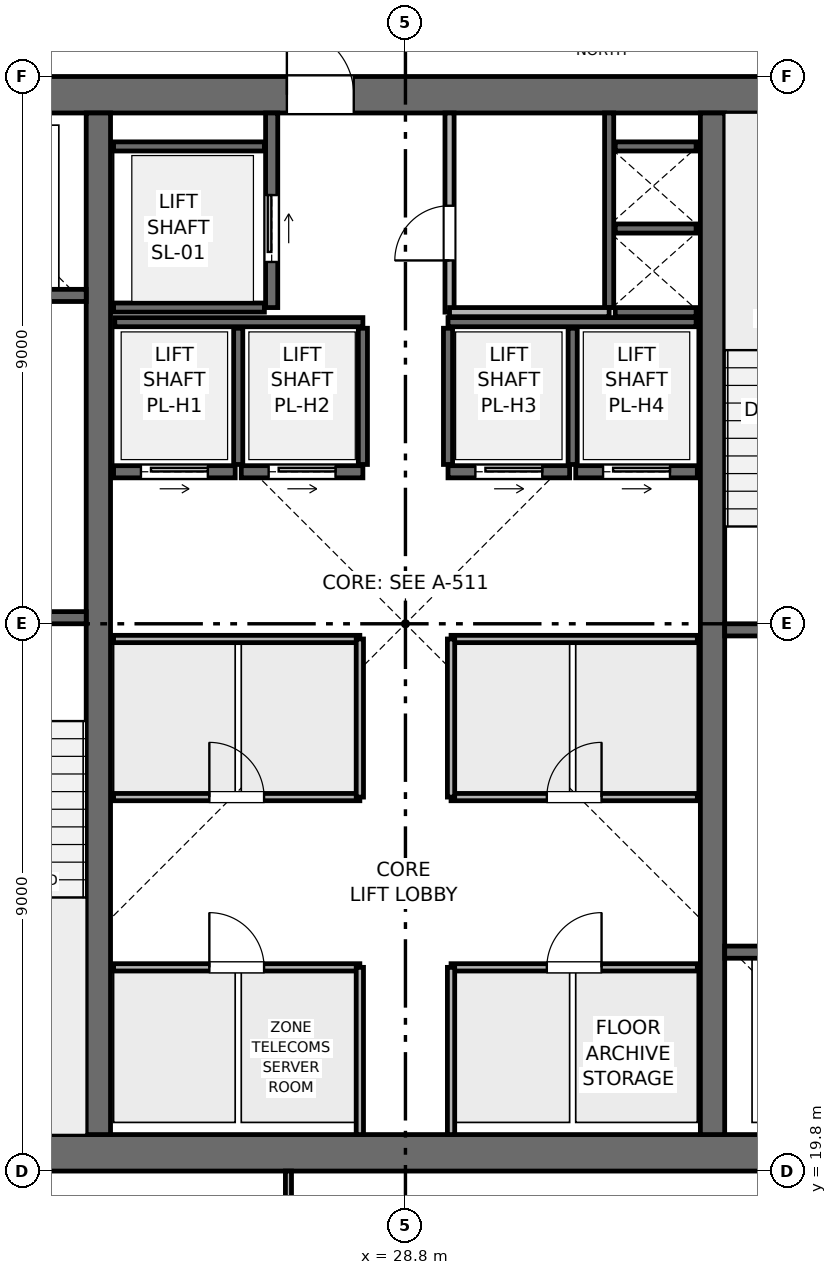
"""IFC4 building model, lengths in metres.
Left out: names, types, materials, properties, quantities, classifications, styles, units other than length and angle.
Written with IfcOpenShell. Run it as: python <this file> out.ifc"""

import sys

from ifc_helpers import new_model, si_unit, direction, frame, frame_2d, origin, place, context, subcontext, project, spatial, rectangle, extrude, element, fill, save


model = new_model("IFC4")
c1 = context("Model", 3, precision=1e-05, world=origin(), true_north=direction((0.0, 1.0)))
c2 = subcontext(c1, "Body", "Model", "MODEL_VIEW")
j1 = project(units=[si_unit("LENGTHUNIT", "METRE"), si_unit("PLANEANGLEUNIT", "RADIAN")], contexts=[c1])
p1 = place(None, origin())
s1 = spatial("IfcSite", under=j1, at=p1, CompositionType="ELEMENT")
p2 = place(p1, origin())
s2 = spatial("IfcBuilding", under=s1, at=p2, CompositionType="ELEMENT")
p3 = place(p2, frame((0.0, 0.0, 344.25)))
s3 = spatial("IfcBuildingStorey", under=s2, at=p3, CompositionType="ELEMENT", Elevation=344.25)
p4 = place(p3, frame((19.8, 20.1, 0.0), z_axis=(0.0, 0.0, 1.0), x_axis=(1.0, 0.0, 0.0)))
e1 = element("IfcWall", 1, at=p4, inside=s3, PredefinedType="SHEAR", context=c2, shape_type="SweptSolid", body=[
    extrude(rectangle(XDim=18.0, YDim=0.6, at=frame_2d((9.0, 0.0))), origin(), (0.0, 0.0, 1.0), 3.75),
])
p5 = place(p3, frame((19.8, 37.5, 0.0), z_axis=(0.0, 0.0, 1.0), x_axis=(1.0, 0.0, 0.0)))
e2 = element("IfcWall", 2, at=p5, inside=s3, PredefinedType="SHEAR", context=c2, shape_type="SweptSolid", body=[
    extrude(rectangle(XDim=18.0, YDim=0.6, at=frame_2d((9.0, 0.0))), origin(), (0.0, 0.0, 1.0), 3.75),
])
p6 = place(p5, frame((7.05, 0.0, 0.0)))
e3 = element("IfcOpeningElement", 3, at=p6, cuts=e2, PredefinedType="OPENING", context=c2, shape_type="SweptSolid", body=[
    extrude(rectangle(XDim=1.1, YDim=2.15, at=frame_2d((0.55, 1.075))), frame((0.0, 0.31, 0.0), z_axis=(0.0, -1.0, 0.0), x_axis=(1.0, 0.0, 0.0)), (0.0, 0.0, 1.0), 0.62),
])
for number, where, z_axis, x_axis in (
    (4, (23.75, 20.4, 0.0), (0.0, 0.0, 1.0), (0.0, 1.0, 0.0)),
    (5, (33.85, 20.4, 0.0), (0.0, 0.0, 1.0), (0.0, 1.0, 0.0)),
):
    element("IfcWall", number, at=place(p3, frame(where, z_axis=z_axis, x_axis=x_axis)), inside=s3, PredefinedType="SHEAR", context=c2, shape_type="SweptSolid", body=[
        extrude(rectangle(XDim=16.8, YDim=0.4, at=frame_2d((8.4, 0.0))), origin(), (0.0, 0.0, 1.0), 3.75),
    ])
p7 = place(p3, frame((20.4, 28.9, 0.0), z_axis=(0.0, 0.0, 1.0), x_axis=(1.0, 0.0, 0.0)))
e6 = element("IfcWall", 6, at=p7, inside=s3, PredefinedType="SHEAR", context=c2, shape_type="SweptSolid", body=[
    extrude(rectangle(XDim=3.15, YDim=0.2, at=frame_2d((1.575, 0.0))), origin(), (0.0, 0.0, 1.0), 3.51),
])
p8 = place(p7, frame((0.8, 0.0, 0.0)))
e7 = element("IfcOpeningElement", 7, at=p8, cuts=e6, PredefinedType="OPENING", context=c2, shape_type="SweptSolid", body=[
    extrude(rectangle(XDim=1.0, YDim=2.1, at=frame_2d((0.5, 1.05))), frame((0.0, 0.11, 0.0), z_axis=(0.0, -1.0, 0.0), x_axis=(1.0, 0.0, 0.0)), (0.0, 0.0, 1.0), 0.22),
])
p9 = place(p3, frame((34.05, 28.7, 0.0), z_axis=(0.0, 0.0, 1.0), x_axis=(1.0, 0.0, 0.0)))
e8 = element("IfcWall", 8, at=p9, inside=s3, PredefinedType="SHEAR", context=c2, shape_type="SweptSolid", body=[
    extrude(rectangle(XDim=3.15, YDim=0.2, at=frame_2d((1.575, 0.0))), origin(), (0.0, 0.0, 1.0), 3.51),
])
p10 = place(p9, frame((0.8, 0.0, 0.0)))
e9 = element("IfcOpeningElement", 9, at=p10, cuts=e8, PredefinedType="OPENING", context=c2, shape_type="SweptSolid", body=[
    extrude(rectangle(XDim=1.0, YDim=2.1, at=frame_2d((0.5, 1.05))), frame((0.0, 0.11, 0.0), z_axis=(0.0, -1.0, 0.0), x_axis=(1.0, 0.0, 0.0)), (0.0, 0.0, 1.0), 0.22),
])
p11 = place(p3, frame((32.15, 34.0, 0.0), z_axis=(0.0, 0.0, 1.0), x_axis=(0.0, 1.0, 0.0)))
e10 = element("IfcWall", 10, at=p11, inside=s3, PredefinedType="SHEAR", context=c2, shape_type="SweptSolid", body=[
    extrude(rectangle(XDim=3.2, YDim=0.15, at=frame_2d((1.6, 0.0))), origin(), (0.0, 0.0, 1.0), 3.51),
])
for number, where, z_axis, x_axis in (
    (11, (32.25, 33.925, 0.0), (0.0, 0.0, 1.0), (1.0, 0.0, 0.0)),
    (12, (32.25, 35.3, 0.0), (0.0, 0.0, 1.0), (1.0, 0.0, 0.0)),
):
    element("IfcWall", number, at=place(p3, frame(where, z_axis=z_axis, x_axis=x_axis)), inside=s3, PredefinedType="SHEAR", context=c2, shape_type="SweptSolid", body=[
        extrude(rectangle(XDim=1.33, YDim=0.15, at=frame_2d((0.665, 0.0))), origin(), (0.0, 0.0, 1.0), 3.51),
    ])
p12 = place(p3, frame((20.5, 34.2, 0.0), z_axis=(0.0, 0.0, 1.0), x_axis=(1.0, 0.0, 0.0)))
e13 = element("IfcWall", 13, at=p12, inside=s3, PredefinedType="SHEAR", context=c2, shape_type="SweptSolid", body=[
    extrude(rectangle(XDim=3.05, YDim=0.2, at=frame_2d((1.525, 0.0))), origin(), (0.0, 0.0, 1.0), 3.51),
])
p13 = place(p12, frame((0.75, 0.0, 0.0)))
e14 = element("IfcOpeningElement", 14, at=p13, cuts=e13, PredefinedType="OPENING", context=c2, shape_type="SweptSolid", body=[
    extrude(rectangle(XDim=1.1, YDim=2.15, at=frame_2d((0.55, 1.075))), frame((0.0, 0.11, 0.0), z_axis=(0.0, -1.0, 0.0), x_axis=(1.0, 0.0, 0.0)), (0.0, 0.0, 1.0), 0.22),
])
p14 = place(p3, frame((34.05, 23.4, 0.0), z_axis=(0.0, 0.0, 1.0), x_axis=(1.0, 0.0, 0.0)))
e15 = element("IfcWall", 15, at=p14, inside=s3, PredefinedType="SHEAR", context=c2, shape_type="SweptSolid", body=[
    extrude(rectangle(XDim=3.05, YDim=0.2, at=frame_2d((1.525, 0.0))), origin(), (0.0, 0.0, 1.0), 3.51),
])
p15 = place(p14, frame((1.2, 0.0, 0.0)))
e16 = element("IfcOpeningElement", 16, at=p15, cuts=e15, PredefinedType="OPENING", context=c2, shape_type="SweptSolid", body=[
    extrude(rectangle(XDim=1.1, YDim=2.15, at=frame_2d((0.55, 1.075))), frame((0.0, 0.11, 0.0), z_axis=(0.0, -1.0, 0.0), x_axis=(1.0, 0.0, 0.0)), (0.0, 0.0, 1.0), 0.22),
])
p16 = place(p3, frame((26.6, 34.0, 0.0), z_axis=(0.0, 0.0, 1.0), x_axis=(0.0, 1.0, 0.0)))
e17 = element("IfcWall", 17, at=p16, inside=s3, PredefinedType="SHEAR", context=c2, shape_type="SweptSolid", body=[
    extrude(rectangle(XDim=3.2, YDim=0.2, at=frame_2d((1.6, 0.0))), origin(), (0.0, 0.0, 1.0), 3.51),
])
p17 = place(p16, frame((0.75, 0.0, 0.0)))
e18 = element("IfcOpeningElement", 18, at=p17, cuts=e17, PredefinedType="OPENING", context=c2, shape_type="SweptSolid", body=[
    extrude(rectangle(XDim=1.1, YDim=2.15, at=frame_2d((0.55, 1.075))), frame((0.0, 0.11, 0.0), z_axis=(0.0, -1.0, 0.0), x_axis=(1.0, 0.0, 0.0)), (0.0, 0.0, 1.0), 0.22),
])
for number, where, z_axis, x_axis in (
    (19, (24.0, 34.0, 0.0), (0.0, 0.0, 1.0), (1.0, 0.0, 0.0)),
    (20, (24.0, 36.65, 0.0), (0.0, 0.0, 1.0), (1.0, 0.0, 0.0)),
):
    element("IfcWall", number, at=place(p3, frame(where, z_axis=z_axis, x_axis=x_axis)), inside=s3, PredefinedType="SHEAR", context=c2, shape_type="SweptSolid", body=[
        extrude(rectangle(XDim=2.48, YDim=0.15, at=frame_2d((1.24, 0.0))), origin(), (0.0, 0.0, 1.0), 3.51),
    ])
p18 = place(p3, frame((24.0, 31.3, 0.0), z_axis=(0.0, 0.0, 1.0), x_axis=(1.0, 0.0, 0.0)))
e21 = element("IfcWall", 21, at=p18, inside=s3, PredefinedType="SHEAR", context=c2, shape_type="SweptSolid", body=[
    extrude(rectangle(XDim=2.0, YDim=0.2, at=frame_2d((1.0, 0.0))), origin(), (0.0, 0.0, 1.0), 3.51),
])
p19 = place(p18, frame((0.45, 0.0, 0.0)))
e22 = element("IfcOpeningElement", 22, at=p19, cuts=e21, PredefinedType="OPENING", context=c2, shape_type="SweptSolid", body=[
    extrude(rectangle(XDim=1.1, YDim=2.15, at=frame_2d((0.55, 1.075))), frame((0.0, 0.11, 0.0), z_axis=(0.0, -1.0, 0.0), x_axis=(1.0, 0.0, 0.0)), (0.0, 0.0, 1.0), 0.22),
])
p20 = place(p3, frame((26.1, 31.3, 0.0), z_axis=(0.0, 0.0, 1.0), x_axis=(1.0, 0.0, 0.0)))
e23 = element("IfcWall", 23, at=p20, inside=s3, PredefinedType="SHEAR", context=c2, shape_type="SweptSolid", body=[
    extrude(rectangle(XDim=2.0, YDim=0.2, at=frame_2d((1.0, 0.0))), origin(), (0.0, 0.0, 1.0), 3.51),
])
p21 = place(p20, frame((0.45, 0.0, 0.0)))
e24 = element("IfcOpeningElement", 24, at=p21, cuts=e23, PredefinedType="OPENING", context=c2, shape_type="SweptSolid", body=[
    extrude(rectangle(XDim=1.1, YDim=2.15, at=frame_2d((0.55, 1.075))), frame((0.0, 0.11, 0.0), z_axis=(0.0, -1.0, 0.0), x_axis=(1.0, 0.0, 0.0)), (0.0, 0.0, 1.0), 0.22),
])
p22 = place(p3, frame((29.5, 31.3, 0.0), z_axis=(0.0, 0.0, 1.0), x_axis=(1.0, 0.0, 0.0)))
e25 = element("IfcWall", 25, at=p22, inside=s3, PredefinedType="SHEAR", context=c2, shape_type="SweptSolid", body=[
    extrude(rectangle(XDim=2.0, YDim=0.2, at=frame_2d((1.0, 0.0))), origin(), (0.0, 0.0, 1.0), 3.51),
])
p23 = place(p22, frame((0.45, 0.0, 0.0)))
e26 = element("IfcOpeningElement", 26, at=p23, cuts=e25, PredefinedType="OPENING", context=c2, shape_type="SweptSolid", body=[
    extrude(rectangle(XDim=1.1, YDim=2.15, at=frame_2d((0.55, 1.075))), frame((0.0, 0.11, 0.0), z_axis=(0.0, -1.0, 0.0), x_axis=(1.0, 0.0, 0.0)), (0.0, 0.0, 1.0), 0.22),
])
p24 = place(p3, frame((31.6, 31.3, 0.0), z_axis=(0.0, 0.0, 1.0), x_axis=(1.0, 0.0, 0.0)))
e27 = element("IfcWall", 27, at=p24, inside=s3, PredefinedType="SHEAR", context=c2, shape_type="SweptSolid", body=[
    extrude(rectangle(XDim=2.0, YDim=0.2, at=frame_2d((1.0, 0.0))), origin(), (0.0, 0.0, 1.0), 3.51),
])
p25 = place(p24, frame((0.45, 0.0, 0.0)))
e28 = element("IfcOpeningElement", 28, at=p25, cuts=e27, PredefinedType="OPENING", context=c2, shape_type="SweptSolid", body=[
    extrude(rectangle(XDim=1.1, YDim=2.15, at=frame_2d((0.55, 1.075))), frame((0.0, 0.11, 0.0), z_axis=(0.0, -1.0, 0.0), x_axis=(1.0, 0.0, 0.0)), (0.0, 0.0, 1.0), 0.22),
])
p26 = place(p3, frame((32.25, 36.65, 0.0), z_axis=(0.0, 0.0, 1.0), x_axis=(1.0, 0.0, 0.0)))
e29 = element("IfcWall", 29, at=p26, inside=s3, PredefinedType="SHEAR", context=c2, shape_type="SweptSolid", body=[
    extrude(rectangle(XDim=1.33, YDim=0.15, at=frame_2d((0.665, 0.0))), origin(), (0.0, 0.0, 1.0), 3.51),
])
for number, where, z_axis, x_axis in (
    (30, (24.02, 33.76, 0.0), (0.0, 0.0, 1.0), (1.0, 0.0, 0.0)),
    (31, (29.5, 33.76, 0.0), (0.0, 0.0, 1.0), (1.0, 0.0, 0.0)),
):
    element("IfcWall", number, at=place(p3, frame(where, z_axis=z_axis, x_axis=x_axis)), inside=s3, PredefinedType="SHEAR", context=c2, shape_type="SweptSolid", body=[
        extrude(rectangle(XDim=4.08, YDim=0.15, at=frame_2d((2.04, 0.0))), origin(), (0.0, 0.0, 1.0), 3.51),
    ])
for number, where, z_axis, x_axis in (
    (32, (26.05, 31.42, 0.0), (0.0, 0.0, 1.0), (0.0, 1.0, 0.0)),
    (33, (28.1, 31.42, 0.0), (0.0, 0.0, 1.0), (0.0, 1.0, 0.0)),
    (34, (29.5, 31.42, 0.0), (0.0, 0.0, 1.0), (0.0, 1.0, 0.0)),
    (35, (31.55, 31.42, 0.0), (0.0, 0.0, 1.0), (0.0, 1.0, 0.0)),
):
    element("IfcWall", number, at=place(p3, frame(where, z_axis=z_axis, x_axis=x_axis)), inside=s3, PredefinedType="SHEAR", context=c2, shape_type="SweptSolid", body=[
        extrude(rectangle(XDim=2.24, YDim=0.15, at=frame_2d((1.12, 0.0))), origin(), (0.0, 0.0, 1.0), 3.51),
    ])
p27 = place(p3, frame((29.525, 33.925, 0.0), z_axis=(0.0, 0.0, 1.0), x_axis=(0.0, 1.0, 0.0)))
e36 = element("IfcWall", 36, at=p27, inside=s3, PredefinedType="PARTITIONING", context=c2, shape_type="SweptSolid", body=[
    extrude(rectangle(XDim=3.275, YDim=0.15, at=frame_2d((1.637, 0.0))), origin(), (0.0, 0.0, 1.0), 3.51),
])
p28 = place(p27, frame((0.85, 0.0, 0.0)))
e37 = element("IfcOpeningElement", 37, at=p28, cuts=e36, PredefinedType="OPENING", context=c2, shape_type="SweptSolid", body=[
    extrude(rectangle(XDim=0.9, YDim=2.1, at=frame_2d((0.45, 1.05))), frame((0.0, 0.085, 0.0), z_axis=(0.0, -1.0, 0.0), x_axis=(1.0, 0.0, 0.0)), (0.0, 0.0, 1.0), 0.17),
])
p29 = place(p3, frame((29.525, 33.925, 0.0), z_axis=(0.0, 0.0, 1.0), x_axis=(1.0, 0.0, 0.0)))
e38 = element("IfcWall", 38, at=p29, inside=s3, PredefinedType="PARTITIONING", context=c2, shape_type="SweptSolid", body=[
    extrude(rectangle(XDim=2.625, YDim=0.15, at=frame_2d((1.312, 0.0))), origin(), (0.0, 0.0, 1.0), 3.51),
])
p30 = place(p3, frame((24.0, 23.15, 0.0), z_axis=(0.0, 0.0, 1.0), x_axis=(1.0, 0.0, 0.0)))
e39 = element("IfcWall", 39, at=p30, inside=s3, PredefinedType="PARTITIONING", context=c2, shape_type="SweptSolid", body=[
    extrude(rectangle(XDim=4.05, YDim=0.12, at=frame_2d((2.025, 0.0))), origin(), (0.0, 0.0, 1.0), 3.51),
])
p31 = place(p30, frame((1.575, 0.0, 0.0)))
e40 = element("IfcOpeningElement", 40, at=p31, cuts=e39, PredefinedType="OPENING", context=c2, shape_type="SweptSolid", body=[
    extrude(rectangle(XDim=0.9, YDim=2.1, at=frame_2d((0.45, 1.05))), frame((0.0, 0.07, 0.0), z_axis=(0.0, -1.0, 0.0), x_axis=(1.0, 0.0, 0.0)), (0.0, 0.0, 1.0), 0.14),
])
p32 = place(p3, frame((28.05, 20.4, 0.0), z_axis=(0.0, 0.0, 1.0), x_axis=(0.0, 1.0, 0.0)))
e41 = element("IfcWall", 41, at=p32, inside=s3, PredefinedType="PARTITIONING", context=c2, shape_type="SweptSolid", body=[
    extrude(rectangle(XDim=2.75, YDim=0.12, at=frame_2d((1.375, 0.0))), origin(), (0.0, 0.0, 1.0), 3.51),
])
p33 = place(p3, frame((29.55, 23.15, 0.0), z_axis=(0.0, 0.0, 1.0), x_axis=(1.0, 0.0, 0.0)))
e42 = element("IfcWall", 42, at=p33, inside=s3, PredefinedType="PARTITIONING", context=c2, shape_type="SweptSolid", body=[
    extrude(rectangle(XDim=4.05, YDim=0.12, at=frame_2d((2.025, 0.0))), origin(), (0.0, 0.0, 1.0), 3.51),
])
p34 = place(p33, frame((1.575, 0.0, 0.0)))
e43 = element("IfcOpeningElement", 43, at=p34, cuts=e42, PredefinedType="OPENING", context=c2, shape_type="SweptSolid", body=[
    extrude(rectangle(XDim=0.9, YDim=2.1, at=frame_2d((0.45, 1.05))), frame((0.0, 0.07, 0.0), z_axis=(0.0, -1.0, 0.0), x_axis=(1.0, 0.0, 0.0)), (0.0, 0.0, 1.0), 0.14),
])
p35 = place(p3, frame((29.55, 20.4, 0.0), z_axis=(0.0, 0.0, 1.0), x_axis=(0.0, 1.0, 0.0)))
e44 = element("IfcWall", 44, at=p35, inside=s3, PredefinedType="PARTITIONING", context=c2, shape_type="SweptSolid", body=[
    extrude(rectangle(XDim=2.75, YDim=0.12, at=frame_2d((1.375, 0.0))), origin(), (0.0, 0.0, 1.0), 3.51),
])
p36 = place(p3, frame((24.0, 25.95, 0.0), z_axis=(0.0, 0.0, 1.0), x_axis=(1.0, 0.0, 0.0)))
e45 = element("IfcWall", 45, at=p36, inside=s3, PredefinedType="PARTITIONING", context=c2, shape_type="SweptSolid", body=[
    extrude(rectangle(XDim=4.05, YDim=0.12, at=frame_2d((2.025, 0.0))), origin(), (0.0, 0.0, 1.0), 3.51),
])
p37 = place(p36, frame((1.575, 0.0, 0.0)))
e46 = element("IfcOpeningElement", 46, at=p37, cuts=e45, PredefinedType="OPENING", context=c2, shape_type="SweptSolid", body=[
    extrude(rectangle(XDim=0.9, YDim=2.1, at=frame_2d((0.45, 1.05))), frame((0.0, 0.07, 0.0), z_axis=(0.0, -1.0, 0.0), x_axis=(1.0, 0.0, 0.0)), (0.0, 0.0, 1.0), 0.14),
])
p38 = place(p3, frame((24.0, 28.55, 0.0), z_axis=(0.0, 0.0, 1.0), x_axis=(1.0, 0.0, 0.0)))
e47 = element("IfcWall", 47, at=p38, inside=s3, PredefinedType="PARTITIONING", context=c2, shape_type="SweptSolid", body=[
    extrude(rectangle(XDim=4.05, YDim=0.12, at=frame_2d((2.025, 0.0))), origin(), (0.0, 0.0, 1.0), 3.51),
])
p39 = place(p3, frame((28.05, 25.95, 0.0), z_axis=(0.0, 0.0, 1.0), x_axis=(0.0, 1.0, 0.0)))
e48 = element("IfcWall", 48, at=p39, inside=s3, PredefinedType="PARTITIONING", context=c2, shape_type="SweptSolid", body=[
    extrude(rectangle(XDim=2.6, YDim=0.12, at=frame_2d((1.3, 0.0))), origin(), (0.0, 0.0, 1.0), 3.51),
])
p40 = place(p3, frame((29.55, 25.95, 0.0), z_axis=(0.0, 0.0, 1.0), x_axis=(1.0, 0.0, 0.0)))
e49 = element("IfcWall", 49, at=p40, inside=s3, PredefinedType="PARTITIONING", context=c2, shape_type="SweptSolid", body=[
    extrude(rectangle(XDim=4.05, YDim=0.12, at=frame_2d((2.025, 0.0))), origin(), (0.0, 0.0, 1.0), 3.51),
])
p41 = place(p40, frame((1.575, 0.0, 0.0)))
e50 = element("IfcOpeningElement", 50, at=p41, cuts=e49, PredefinedType="OPENING", context=c2, shape_type="SweptSolid", body=[
    extrude(rectangle(XDim=0.9, YDim=2.1, at=frame_2d((0.45, 1.05))), frame((0.0, 0.07, 0.0), z_axis=(0.0, -1.0, 0.0), x_axis=(1.0, 0.0, 0.0)), (0.0, 0.0, 1.0), 0.14),
])
p42 = place(p3, frame((29.55, 28.55, 0.0), z_axis=(0.0, 0.0, 1.0), x_axis=(1.0, 0.0, 0.0)))
e51 = element("IfcWall", 51, at=p42, inside=s3, PredefinedType="PARTITIONING", context=c2, shape_type="SweptSolid", body=[
    extrude(rectangle(XDim=4.05, YDim=0.12, at=frame_2d((2.025, 0.0))), origin(), (0.0, 0.0, 1.0), 3.51),
])
p43 = place(p3, frame((29.55, 25.95, 0.0), z_axis=(0.0, 0.0, 1.0), x_axis=(0.0, 1.0, 0.0)))
e52 = element("IfcWall", 52, at=p43, inside=s3, PredefinedType="PARTITIONING", context=c2, shape_type="SweptSolid", body=[
    extrude(rectangle(XDim=2.6, YDim=0.12, at=frame_2d((1.3, 0.0))), origin(), (0.0, 0.0, 1.0), 3.51),
])
p44 = place(p3, frame((26.876, 7.63, 0.0), z_axis=(0.0, 0.0, 1.0), x_axis=(0.0, 1.0, 0.0)))
e53 = element("IfcWall", 53, at=p44, inside=s3, PredefinedType="MOVABLE", context=c2, shape_type="SweptSolid", body=[
    extrude(rectangle(XDim=12.17, YDim=0.1, at=frame_2d((6.085, 0.0))), origin(), (0.0, 0.0, 1.0), 3.135),
])
p45 = place(p44, frame((9.77, 0.0, 0.0)))
e54 = element("IfcOpeningElement", 54, at=p45, cuts=e53, PredefinedType="OPENING", context=c2, shape_type="SweptSolid", body=[
    extrude(rectangle(XDim=0.9, YDim=2.1, at=frame_2d((0.45, 1.05))), frame((0.0, 0.06, 0.0), z_axis=(0.0, -1.0, 0.0), x_axis=(1.0, 0.0, 0.0)), (0.0, 0.0, 1.0), 0.12),
])
p46 = place(p17, origin())
e55 = element("IfcDoor", 55, at=p46, inside=s3, OperationType="SLIDING_TO_RIGHT", PredefinedType="DOOR", context=c2, shape_type="SweptSolid", body=[
    extrude(rectangle(XDim=1.1, YDim=2.15, at=frame_2d((0.55, 1.075))), frame((0.0, 0.025, 0.0), z_axis=(0.0, -1.0, 0.0), x_axis=(1.0, 0.0, 0.0)), (0.0, 0.0, 1.0), 0.05),
])
fill(e18, e55)
p47 = place(p19, origin())
e56 = element("IfcDoor", 56, at=p47, inside=s3, OperationType="SLIDING_TO_RIGHT", PredefinedType="DOOR", context=c2, shape_type="SweptSolid", body=[
    extrude(rectangle(XDim=1.1, YDim=2.15, at=frame_2d((0.55, 1.075))), frame((0.0, 0.025, 0.0), z_axis=(0.0, -1.0, 0.0), x_axis=(1.0, 0.0, 0.0)), (0.0, 0.0, 1.0), 0.05),
])
fill(e22, e56)
p48 = place(p21, origin())
e57 = element("IfcDoor", 57, at=p48, inside=s3, OperationType="SLIDING_TO_RIGHT", PredefinedType="DOOR", context=c2, shape_type="SweptSolid", body=[
    extrude(rectangle(XDim=1.1, YDim=2.15, at=frame_2d((0.55, 1.075))), frame((0.0, 0.025, 0.0), z_axis=(0.0, -1.0, 0.0), x_axis=(1.0, 0.0, 0.0)), (0.0, 0.0, 1.0), 0.05),
])
fill(e24, e57)
p49 = place(p23, origin())
e58 = element("IfcDoor", 58, at=p49, inside=s3, OperationType="SLIDING_TO_RIGHT", PredefinedType="DOOR", context=c2, shape_type="SweptSolid", body=[
    extrude(rectangle(XDim=1.1, YDim=2.15, at=frame_2d((0.55, 1.075))), frame((0.0, 0.025, 0.0), z_axis=(0.0, -1.0, 0.0), x_axis=(1.0, 0.0, 0.0)), (0.0, 0.0, 1.0), 0.05),
])
fill(e26, e58)
p50 = place(p25, origin())
e59 = element("IfcDoor", 59, at=p50, inside=s3, OperationType="SLIDING_TO_RIGHT", PredefinedType="DOOR", context=c2, shape_type="SweptSolid", body=[
    extrude(rectangle(XDim=1.1, YDim=2.15, at=frame_2d((0.55, 1.075))), frame((0.0, 0.025, 0.0), z_axis=(0.0, -1.0, 0.0), x_axis=(1.0, 0.0, 0.0)), (0.0, 0.0, 1.0), 0.05),
])
fill(e28, e59)
p51 = place(p28, origin())
e60 = element("IfcDoor", 60, at=p51, inside=s3, OperationType="SINGLE_SWING_LEFT", PredefinedType="DOOR", context=c2, shape_type="SweptSolid", body=[
    extrude(rectangle(XDim=0.9, YDim=2.1, at=frame_2d((0.45, 1.05))), frame((0.0, 0.025, 0.0), z_axis=(0.0, -1.0, 0.0), x_axis=(1.0, 0.0, 0.0)), (0.0, 0.0, 1.0), 0.05),
])
fill(e37, e60)
p52 = place(p31, origin())
e61 = element("IfcDoor", 61, at=p52, inside=s3, OperationType="SINGLE_SWING_LEFT", PredefinedType="DOOR", context=c2, shape_type="SweptSolid", body=[
    extrude(rectangle(XDim=0.9, YDim=2.1, at=frame_2d((0.45, 1.05))), frame((0.0, 0.025, 0.0), z_axis=(0.0, -1.0, 0.0), x_axis=(1.0, 0.0, 0.0)), (0.0, 0.0, 1.0), 0.05),
])
fill(e40, e61)
p53 = place(p34, origin())
e62 = element("IfcDoor", 62, at=p53, inside=s3, OperationType="SINGLE_SWING_RIGHT", PredefinedType="DOOR", context=c2, shape_type="SweptSolid", body=[
    extrude(rectangle(XDim=0.9, YDim=2.1, at=frame_2d((0.45, 1.05))), frame((0.0, 0.025, 0.0), z_axis=(0.0, -1.0, 0.0), x_axis=(1.0, 0.0, 0.0)), (0.0, 0.0, 1.0), 0.05),
])
fill(e43, e62)
p54 = place(p37, origin())
e63 = element("IfcDoor", 63, at=p54, inside=s3, OperationType="SINGLE_SWING_LEFT", PredefinedType="DOOR", context=c2, shape_type="SweptSolid", body=[
    extrude(rectangle(XDim=0.9, YDim=2.1, at=frame_2d((0.45, 1.05))), frame((0.0, 0.025, 0.0), z_axis=(0.0, -1.0, 0.0), x_axis=(1.0, 0.0, 0.0)), (0.0, 0.0, 1.0), 0.05),
])
fill(e46, e63)
p55 = place(p41, origin())
e64 = element("IfcDoor", 64, at=p55, inside=s3, OperationType="SINGLE_SWING_RIGHT", PredefinedType="DOOR", context=c2, shape_type="SweptSolid", body=[
    extrude(rectangle(XDim=0.9, YDim=2.1, at=frame_2d((0.45, 1.05))), frame((0.0, 0.025, 0.0), z_axis=(0.0, -1.0, 0.0), x_axis=(1.0, 0.0, 0.0)), (0.0, 0.0, 1.0), 0.05),
])
fill(e50, e64)
p56 = place(p6, origin())
e65 = element("IfcDoor", 65, at=p56, inside=s3, OperationType="SINGLE_SWING_LEFT", PredefinedType="DOOR", context=c2, shape_type="SweptSolid", body=[
    extrude(rectangle(XDim=1.1, YDim=2.15, at=frame_2d((0.55, 1.075))), frame((0.0, 0.025, 0.0), z_axis=(0.0, -1.0, 0.0), x_axis=(1.0, 0.0, 0.0)), (0.0, 0.0, 1.0), 0.05),
])
fill(e3, e65)
save(model, sys.argv[1])
